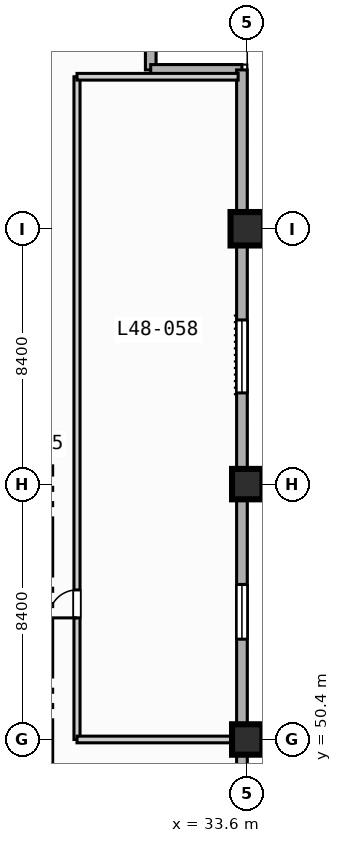
"""IFC4 building model, lengths in metres.
Left out: names, types, materials, properties, quantities, classifications, styles, units other than length and angle.
Written with IfcOpenShell. Run it as: python <this file> out.ifc"""

import sys

from ifc_helpers import new_model, si_unit, direction, frame, frame_2d, origin, origin_2d, place, context, subcontext, project, spatial, rectangle, extrude, element, fill, save


model = new_model("IFC4")
c1 = context("Model", 3, precision=1e-05, world=origin(), true_north=direction((0.0, 1.0)))
c2 = subcontext(c1, "Body", "Model", "MODEL_VIEW")
j1 = project(units=[si_unit("LENGTHUNIT", "METRE"), si_unit("PLANEANGLEUNIT", "RADIAN")], contexts=[c1])
p1 = place(None, origin())
s1 = spatial("IfcSite", under=j1, at=p1, CompositionType="ELEMENT")
p2 = place(p1, origin())
s2 = spatial("IfcBuilding", under=s1, at=p2, CompositionType="ELEMENT")
p3 = place(p2, frame((0.0, 0.0, 197.6)))
s3 = spatial("IfcBuildingStorey", under=s2, at=p3, CompositionType="ELEMENT", Elevation=197.6)
for number, where, z_axis, x_axis in (
    (1, (33.6, 50.4, 0.0), (0.0, 0.0, 1.0), (1.0, 0.0, 0.0)),
    (2, (33.6, 58.8, 0.0), (0.0, 0.0, 1.0), (1.0, 0.0, 0.0)),
):
    element("IfcColumn", number, at=place(p3, frame(where, z_axis=z_axis, x_axis=x_axis)), inside=s3, PredefinedType="COLUMN", context=c2, shape_type="SweptSolid", body=[
        extrude(rectangle(XDim=1.0, YDim=1.0, at=origin_2d()), origin(), (0.0, 0.0, 1.0), 3.7),
    ])
p4 = place(p3, frame((33.6, 67.2, 0.0), z_axis=(0.0, 0.0, 1.0), x_axis=(1.0, 0.0, 0.0)))
e3 = element("IfcColumn", 3, at=p4, inside=s3, PredefinedType="COLUMN", context=c2, shape_type="SweptSolid", body=[
    extrude(rectangle(XDim=1.1, YDim=1.1, at=origin_2d()), origin(), (0.0, 0.0, 1.0), 3.7),
])
for number, where, z_axis, x_axis in (
    (4, (30.425, 75.425, 0.0), (0.0, 0.0, 1.0), (0.0, -1.0, 0.0)),
    (5, (30.425, 72.425, 0.0), (0.0, 0.0, 1.0), (1.0, 0.0, 0.0)),
):
    element("IfcWall", number, at=place(p3, frame(where, z_axis=z_axis, x_axis=x_axis)), inside=s3, PredefinedType="STANDARD", context=c2, shape_type="SweptSolid", body=[
        extrude(rectangle(XDim=3.0, YDim=0.35, at=frame_2d((1.5, 0.0))), origin(), (0.0, 0.0, 1.0), 3.47),
    ])
p5 = place(p3, frame((33.425, 72.425, 0.0), z_axis=(0.0, 0.0, 1.0), x_axis=(0.0, -1.0, 0.0)))
e6 = element("IfcWall", 6, at=p5, inside=s3, PredefinedType="STANDARD", context=c2, shape_type="SweptSolid", body=[
    extrude(rectangle(XDim=39.0, YDim=0.35, at=frame_2d((19.5, 0.0))), origin(), (0.0, 0.0, 1.0), 3.47),
])
p6 = place(p5, frame((33.725, 0.0, 0.85)))
e7 = element("IfcOpeningElement", 7, at=p6, cuts=e6, PredefinedType="OPENING", context=c2, shape_type="SweptSolid", body=[
    extrude(rectangle(XDim=1.8, YDim=1.8, at=frame_2d((0.9, 0.9))), frame((0.0, 0.185, 0.0), z_axis=(0.0, -1.0, 0.0), x_axis=(1.0, 0.0, 0.0)), (0.0, 0.0, 1.0), 0.37),
])
p7 = place(p5, frame((16.925, 0.0, 0.85)))
e8 = element("IfcOpeningElement", 8, at=p7, cuts=e6, PredefinedType="OPENING", context=c2, shape_type="SweptSolid", body=[
    extrude(rectangle(XDim=1.8, YDim=1.8, at=frame_2d((0.9, 0.9))), frame((0.0, 0.185, 0.0), z_axis=(0.0, -1.0, 0.0), x_axis=(1.0, 0.0, 0.0)), (0.0, 0.0, 1.0), 0.37),
])
p8 = place(p5, frame((8.225, 0.0, 0.85)))
e9 = element("IfcOpeningElement", 9, at=p8, cuts=e6, PredefinedType="OPENING", context=c2, shape_type="SweptSolid", body=[
    extrude(rectangle(XDim=2.4, YDim=1.95, at=frame_2d((1.2, 0.975))), frame((0.0, 0.185, 0.0), z_axis=(0.0, -1.0, 0.0), x_axis=(1.0, 0.0, 0.0)), (0.0, 0.0, 1.0), 0.37),
])
p9 = place(p3, frame((28.0, 50.4, 0.0), z_axis=(0.0, 0.0, 1.0), x_axis=(0.0, 1.0, 0.0)))
e10 = element("IfcWall", 10, at=p9, inside=s3, PredefinedType="PARTITIONING", context=c2, shape_type="SweptSolid", body=[
    extrude(rectangle(XDim=21.8, YDim=0.2, at=frame_2d((10.9, 0.0))), origin(), (0.0, 0.0, 1.0), 3.47),
])
p10 = place(p9, frame((4.0, 0.0, 0.0)))
e11 = element("IfcOpeningElement", 11, at=p10, cuts=e10, PredefinedType="OPENING", context=c2, shape_type="SweptSolid", body=[
    extrude(rectangle(XDim=0.92, YDim=2.1, at=frame_2d((0.46, 1.05))), frame((0.0, 0.11, 0.0), z_axis=(0.0, -1.0, 0.0), x_axis=(1.0, 0.0, 0.0)), (0.0, 0.0, 1.0), 0.22),
])
p11 = place(p3, frame((28.0, 50.4, 0.0), z_axis=(0.0, 0.0, 1.0), x_axis=(1.0, 0.0, 0.0)))
e12 = element("IfcWall", 12, at=p11, inside=s3, PredefinedType="PARTITIONING", context=c2, shape_type="SweptSolid", body=[
    extrude(rectangle(XDim=5.3, YDim=0.22, at=frame_2d((2.65, 0.0))), origin(), (0.0, 0.0, 1.0), 3.16),
])
p12 = place(p3, frame((28.0, 72.2, 0.0), z_axis=(0.0, 0.0, 1.0), x_axis=(1.0, 0.0, 0.0)))
e13 = element("IfcWall", 13, at=p12, inside=s3, PredefinedType="PARTITIONING", context=c2, shape_type="SweptSolid", body=[
    extrude(rectangle(XDim=5.3, YDim=0.22, at=frame_2d((2.65, 0.0))), origin(), (0.0, 0.0, 1.0), 3.47),
])
p13 = place(p7, origin())
e14 = element("IfcWindow", 14, at=p13, inside=s3, PartitioningType="SINGLE_PANEL", PredefinedType="WINDOW", context=c2, shape_type="SweptSolid", body=[
    extrude(rectangle(XDim=1.8, YDim=1.8, at=frame_2d((0.9, 0.9))), frame((0.0, 0.03, 0.0), z_axis=(0.0, -1.0, 0.0), x_axis=(1.0, 0.0, 0.0)), (0.0, 0.0, 1.0), 0.06),
])
fill(e8, e14)
p14 = place(p8, origin())
e15 = element("IfcWindow", 15, at=p14, inside=s3, PartitioningType="SINGLE_PANEL", PredefinedType="WINDOW", context=c2, shape_type="SweptSolid", body=[
    extrude(rectangle(XDim=2.4, YDim=1.95, at=frame_2d((1.2, 0.975))), frame((0.0, 0.03, 0.0), z_axis=(0.0, -1.0, 0.0), x_axis=(1.0, 0.0, 0.0)), (0.0, 0.0, 1.0), 0.06),
])
fill(e9, e15)
p15 = place(p10, origin())
e16 = element("IfcDoor", 16, at=p15, inside=s3, OperationType="SINGLE_SWING_LEFT", PredefinedType="DOOR", context=c2, shape_type="SweptSolid", body=[
    extrude(rectangle(XDim=0.92, YDim=2.1, at=frame_2d((0.46, 1.05))), frame((0.0, 0.025, 0.0), z_axis=(0.0, -1.0, 0.0), x_axis=(1.0, 0.0, 0.0)), (0.0, 0.0, 1.0), 0.05),
])
fill(e11, e16)
save(model, sys.argv[1])
